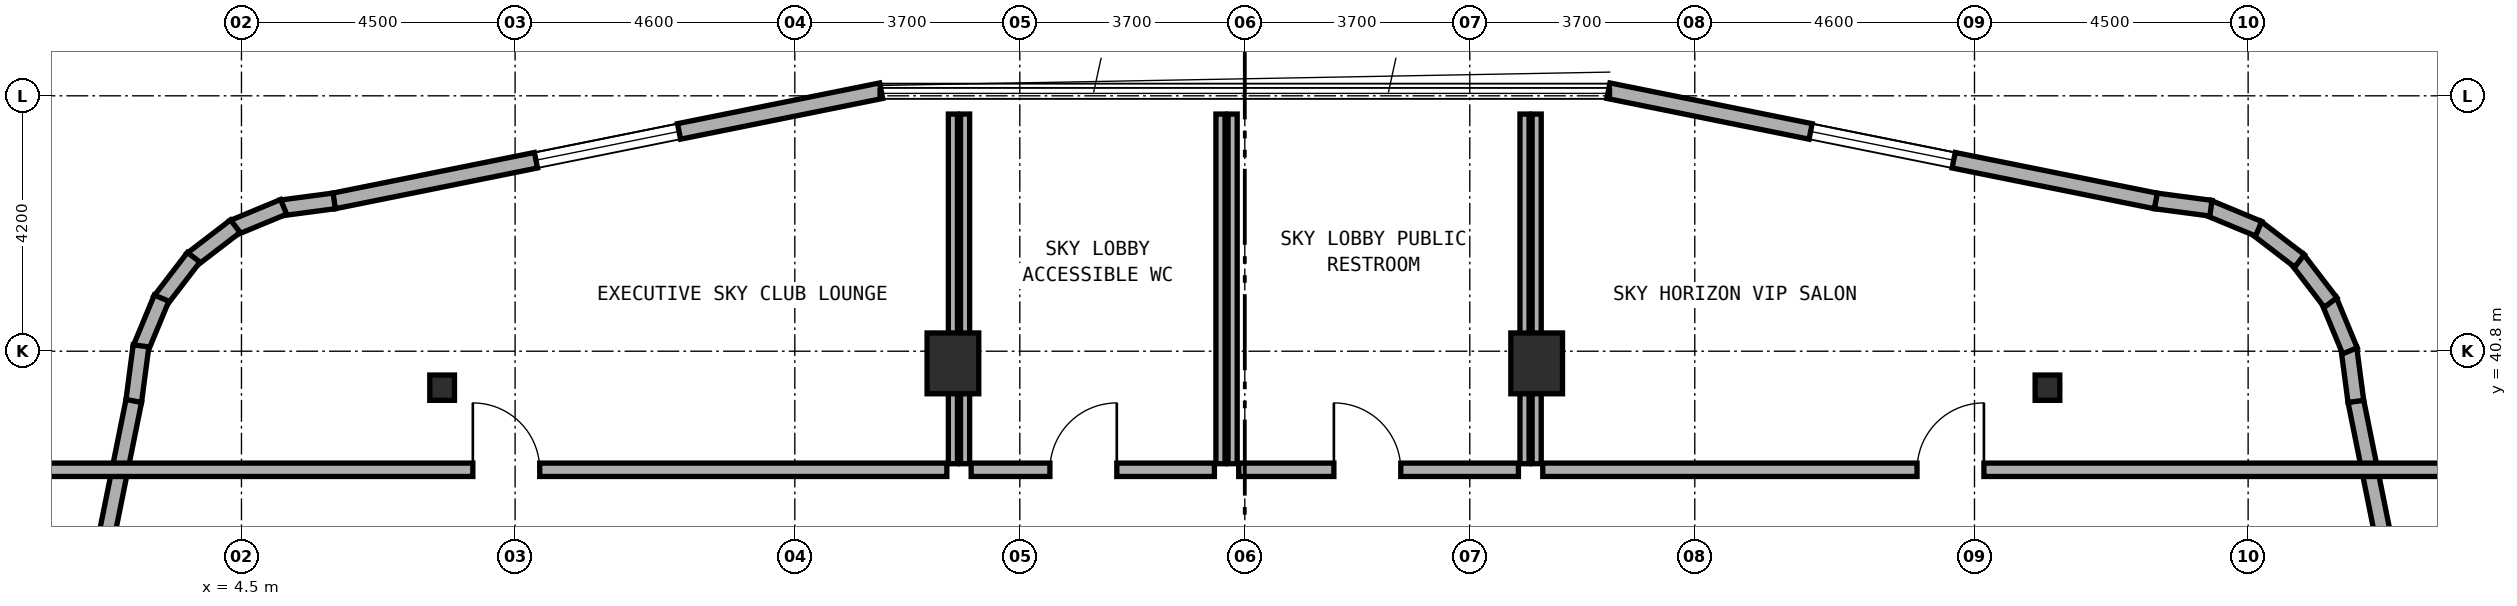
"""IFC4 building model, lengths in metres.
Left out: names, types, materials, properties, quantities, classifications, styles, units other than length and angle.
Written with IfcOpenShell. Run it as: python <this file> out.ifc"""

import sys

from ifc_helpers import new_model, si_unit, direction, frame, frame_2d, origin, origin_2d, place, context, subcontext, project, spatial, rectangle, i_section, extrude, element, fill, save


model = new_model("IFC4")
c1 = context("Model", 3, precision=1e-05, world=origin(), true_north=direction((0.0, 1.0)))
c2 = subcontext(c1, "Body", "Model", "MODEL_VIEW")
j1 = project(units=[si_unit("LENGTHUNIT", "METRE"), si_unit("PLANEANGLEUNIT", "RADIAN")], contexts=[c1])
p1 = place(None, origin())
s1 = spatial("IfcSite", under=j1, at=p1, CompositionType="ELEMENT")
p2 = place(p1, origin())
s2 = spatial("IfcBuilding", under=s1, at=p2, CompositionType="ELEMENT")
p3 = place(p2, frame((0.0, 0.0, 119.5)))
s3 = spatial("IfcBuildingStorey", under=s2, at=p3, CompositionType="ELEMENT", Elevation=119.5)
for number, where, z_axis, x_axis in (
    (1, (16.2, 40.6, 0.0), (0.0, 0.0, 1.0), (1.0, 0.0, 0.0)),
    (2, (25.8, 40.6, 0.0), (0.0, 0.0, 1.0), (1.0, 0.0, 0.0)),
):
    element("IfcColumn", number, at=place(p3, frame(where, z_axis=z_axis, x_axis=x_axis)), inside=s3, PredefinedType="COLUMN", context=c2, shape_type="SweptSolid", body=[
        extrude(rectangle(XDim=0.85, YDim=1.0, at=origin_2d()), origin(), (0.0, 0.0, 1.0), 4.5),
    ])
for number, where, z_axis, x_axis in (
    (3, (34.2, 40.2, 0.0), (0.0, 0.0, 1.0), (1.0, 0.0, 0.0)),
    (4, (7.8, 40.2, 0.0), (0.0, 0.0, 1.0), (1.0, 0.0, 0.0)),
):
    element("IfcColumn", number, at=place(p3, frame(where, z_axis=z_axis, x_axis=x_axis)), inside=s3, PredefinedType="COLUMN", context=c2, shape_type="SweptSolid", body=[
        extrude(i_section(OverallWidth=0.406, OverallDepth=0.416, WebThickness=0.024, FlangeThickness=0.039, FilletRadius=0.015, at=origin_2d()), origin(), (0.0, 0.0, 1.0), 4.5),
    ])
p4 = place(p3, frame((41.084, 30.98, 0.0), z_axis=(0.0, 0.0, 1.0), x_axis=(-0.197435082048, 0.980315963543, 0.0)))
e5 = element("IfcWall", 5, at=p4, inside=s3, PredefinedType="STANDARD", context=c2, shape_type="SweptSolid", body=[
    extrude(rectangle(XDim=9.183, YDim=0.26, at=frame_2d((4.591, 0.0))), origin(), (0.0, 0.0, 1.0), 4.22),
])
p5 = place(p4, frame((2.752, 0.0, 0.8)))
e6 = element("IfcOpeningElement", 6, at=p5, cuts=e5, PredefinedType="OPENING", context=c2, shape_type="SweptSolid", body=[
    extrude(rectangle(XDim=2.4, YDim=1.6, at=frame_2d((1.2, 0.8))), frame((0.0, 0.14, 0.0), z_axis=(0.0, -1.0, 0.0), x_axis=(1.0, 0.0, 0.0)), (0.0, 0.0, 1.0), 0.28),
])
p6 = place(p3, frame((39.272, 39.975, 0.0), z_axis=(0.0, 0.0, 1.0), x_axis=(-0.130953706898, 0.991388484223, 0.0)))
e7 = element("IfcWall", 7, at=p6, inside=s3, PredefinedType="STANDARD", context=c2, shape_type="SweptSolid", body=[
    extrude(rectangle(XDim=0.885, YDim=0.26, at=frame_2d((0.443, 0.0))), origin(), (0.0, 0.0, 1.0), 4.22),
])
p7 = place(p3, frame((39.174, 40.807, 0.0), z_axis=(0.0, 0.0, 1.0), x_axis=(-0.383290660547, 0.923627776508, 0.0)))
e8 = element("IfcWall", 8, at=p7, inside=s3, PredefinedType="STANDARD", context=c2, shape_type="SweptSolid", body=[
    extrude(rectangle(XDim=0.903, YDim=0.26, at=frame_2d((0.452, 0.0))), origin(), (0.0, 0.0, 1.0), 4.22),
])
p8 = place(p3, frame((38.856, 41.601, 0.0), z_axis=(0.0, 0.0, 1.0), x_axis=(-0.608624690463, 0.793458244748, 0.0)))
e9 = element("IfcWall", 9, at=p8, inside=s3, PredefinedType="STANDARD", context=c2, shape_type="SweptSolid", body=[
    extrude(rectangle(XDim=0.902, YDim=0.26, at=frame_2d((0.451, 0.0))), origin(), (0.0, 0.0, 1.0), 4.22),
])
p9 = place(p3, frame((38.345, 42.286, 0.0), z_axis=(0.0, 0.0, 1.0), x_axis=(-0.793558456666, 0.608494022858, 0.0)))
e10 = element("IfcWall", 10, at=p9, inside=s3, PredefinedType="STANDARD", context=c2, shape_type="SweptSolid", body=[
    extrude(rectangle(XDim=0.902, YDim=0.26, at=frame_2d((0.451, 0.0))), origin(), (0.0, 0.0, 1.0), 4.22),
])
p10 = place(p3, frame((37.673, 42.814, 0.0), z_axis=(0.0, 0.0, 1.0), x_axis=(-0.923683767999, 0.383155708213, 0.0)))
e11 = element("IfcWall", 11, at=p10, inside=s3, PredefinedType="STANDARD", context=c2, shape_type="SweptSolid", body=[
    extrude(rectangle(XDim=0.903, YDim=0.26, at=frame_2d((0.451, 0.0))), origin(), (0.0, 0.0, 1.0), 4.22),
])
p11 = place(p3, frame((36.888, 43.152, 0.0), z_axis=(0.0, 0.0, 1.0), x_axis=(-0.991487658083, 0.130200706103, 0.0)))
e12 = element("IfcWall", 12, at=p11, inside=s3, PredefinedType="STANDARD", context=c2, shape_type="SweptSolid", body=[
    extrude(rectangle(XDim=0.921, YDim=0.26, at=frame_2d((0.46, 0.0))), origin(), (0.0, 0.0, 1.0), 4.22),
])
p12 = place(p3, frame((35.982, 43.271, 0.0), z_axis=(0.0, 0.0, 1.0), x_axis=(-0.980315963543, 0.197435082048, 0.0)))
e13 = element("IfcWall", 13, at=p12, inside=s3, PredefinedType="STANDARD", context=c2, shape_type="SweptSolid", body=[
    extrude(rectangle(XDim=9.183, YDim=0.26, at=frame_2d((4.591, 0.0))), origin(), (0.0, 0.0, 1.0), 4.22),
])
p13 = place(p12, frame((3.391, 0.0, 0.8)))
e14 = element("IfcOpeningElement", 14, at=p13, cuts=e13, PredefinedType="OPENING", context=c2, shape_type="SweptSolid", body=[
    extrude(rectangle(XDim=2.4, YDim=1.6, at=frame_2d((1.2, 0.8))), frame((0.0, 0.14, 0.0), z_axis=(0.0, -1.0, 0.0), x_axis=(1.0, 0.0, 0.0)), (0.0, 0.0, 1.0), 0.28),
])
p14 = place(p3, frame((15.02, 45.084, 0.0), z_axis=(0.0, 0.0, 1.0), x_axis=(-0.980315963543, -0.197435082048, 0.0)))
e15 = element("IfcWall", 15, at=p14, inside=s3, PredefinedType="STANDARD", context=c2, shape_type="SweptSolid", body=[
    extrude(rectangle(XDim=9.183, YDim=0.26, at=frame_2d((4.591, 0.0))), origin(), (0.0, 0.0, 1.0), 4.22),
])
p15 = place(p14, frame((3.391, 0.0, 0.8)))
e16 = element("IfcOpeningElement", 16, at=p15, cuts=e15, PredefinedType="OPENING", context=c2, shape_type="SweptSolid", body=[
    extrude(rectangle(XDim=2.4, YDim=1.6, at=frame_2d((1.2, 0.8))), frame((0.0, 0.14, 0.0), z_axis=(0.0, -1.0, 0.0), x_axis=(1.0, 0.0, 0.0)), (0.0, 0.0, 1.0), 0.28),
])
p16 = place(p3, frame((6.025, 43.272, 0.0), z_axis=(0.0, 0.0, 1.0), x_axis=(-0.991388484223, -0.130953706898, 0.0)))
e17 = element("IfcWall", 17, at=p16, inside=s3, PredefinedType="STANDARD", context=c2, shape_type="SweptSolid", body=[
    extrude(rectangle(XDim=0.885, YDim=0.26, at=frame_2d((0.443, 0.0))), origin(), (0.0, 0.0, 1.0), 4.22),
])
p17 = place(p3, frame((5.193, 43.174, 0.0), z_axis=(0.0, 0.0, 1.0), x_axis=(-0.923627776508, -0.383290660547, 0.0)))
e18 = element("IfcWall", 18, at=p17, inside=s3, PredefinedType="STANDARD", context=c2, shape_type="SweptSolid", body=[
    extrude(rectangle(XDim=0.903, YDim=0.26, at=frame_2d((0.452, 0.0))), origin(), (0.0, 0.0, 1.0), 4.22),
])
p18 = place(p3, frame((4.399, 42.856, 0.0), z_axis=(0.0, 0.0, 1.0), x_axis=(-0.793458244748, -0.608624690463, 0.0)))
e19 = element("IfcWall", 19, at=p18, inside=s3, PredefinedType="STANDARD", context=c2, shape_type="SweptSolid", body=[
    extrude(rectangle(XDim=0.902, YDim=0.26, at=frame_2d((0.451, 0.0))), origin(), (0.0, 0.0, 1.0), 4.22),
])
p19 = place(p3, frame((3.714, 42.345, 0.0), z_axis=(0.0, 0.0, 1.0), x_axis=(-0.608494022858, -0.793558456666, 0.0)))
e20 = element("IfcWall", 20, at=p19, inside=s3, PredefinedType="STANDARD", context=c2, shape_type="SweptSolid", body=[
    extrude(rectangle(XDim=0.902, YDim=0.26, at=frame_2d((0.451, 0.0))), origin(), (0.0, 0.0, 1.0), 4.22),
])
p20 = place(p3, frame((3.186, 41.673, 0.0), z_axis=(0.0, 0.0, 1.0), x_axis=(-0.383155708213, -0.923683767999, 0.0)))
e21 = element("IfcWall", 21, at=p20, inside=s3, PredefinedType="STANDARD", context=c2, shape_type="SweptSolid", body=[
    extrude(rectangle(XDim=0.903, YDim=0.26, at=frame_2d((0.451, 0.0))), origin(), (0.0, 0.0, 1.0), 4.22),
])
p21 = place(p3, frame((2.848, 40.888, 0.0), z_axis=(0.0, 0.0, 1.0), x_axis=(-0.130200706103, -0.991487658083, 0.0)))
e22 = element("IfcWall", 22, at=p21, inside=s3, PredefinedType="STANDARD", context=c2, shape_type="SweptSolid", body=[
    extrude(rectangle(XDim=0.921, YDim=0.26, at=frame_2d((0.46, 0.0))), origin(), (0.0, 0.0, 1.0), 4.22),
])
p22 = place(p3, frame((2.729, 39.982, 0.0), z_axis=(0.0, 0.0, 1.0), x_axis=(-0.197435082048, -0.980315963543, 0.0)))
e23 = element("IfcWall", 23, at=p22, inside=s3, PredefinedType="STANDARD", context=c2, shape_type="SweptSolid", body=[
    extrude(rectangle(XDim=9.183, YDim=0.26, at=frame_2d((4.591, 0.0))), origin(), (0.0, 0.0, 1.0), 4.22),
])
p23 = place(p22, frame((3.27, 0.0, 0.8)))
e24 = element("IfcOpeningElement", 24, at=p23, cuts=e23, PredefinedType="OPENING", context=c2, shape_type="SweptSolid", body=[
    extrude(rectangle(XDim=2.4, YDim=1.6, at=frame_2d((1.2, 0.8))), frame((0.0, 0.14, 0.0), z_axis=(0.0, -1.0, 0.0), x_axis=(1.0, 0.0, 0.0)), (0.0, 0.0, 1.0), 0.28),
])
p24 = place(p3, frame((16.2, 38.95, 0.0), z_axis=(0.0, 0.0, 1.0), x_axis=(0.0, 1.0, 0.0)))
e25 = element("IfcWall", 25, at=p24, inside=s3, PredefinedType="PARTITIONING", context=c2, shape_type="SweptSolid", body=[
    extrude(rectangle(XDim=5.75, YDim=0.15, at=frame_2d((2.875, 0.0))), origin(), (0.0, 0.0, 1.0), 3.695),
])
p25 = place(p3, frame((1.3, 38.85, 0.0), z_axis=(0.0, 0.0, 1.0), x_axis=(1.0, 0.0, 0.0)))
e26 = element("IfcWall", 26, at=p25, inside=s3, PredefinedType="SOLIDWALL", context=c2, shape_type="SweptSolid", body=[
    extrude(rectangle(XDim=14.8, YDim=0.22, at=frame_2d((7.4, 0.0))), origin(), (0.0, 0.0, 1.0), 3.695),
])
p26 = place(p25, frame((7.005, 0.0, 0.0)))
e27 = element("IfcOpeningElement", 27, at=p26, cuts=e26, PredefinedType="OPENING", context=c2, shape_type="SweptSolid", body=[
    extrude(rectangle(XDim=1.1, YDim=2.1, at=frame_2d((0.55, 1.05))), frame((0.0, 0.12, 0.0), z_axis=(0.0, -1.0, 0.0), x_axis=(1.0, 0.0, 0.0)), (0.0, 0.0, 1.0), 0.24),
])
p27 = place(p3, frame((16.4, 38.95, 0.0), z_axis=(0.0, 0.0, 1.0), x_axis=(0.0, 1.0, 0.0)))
e28 = element("IfcWall", 28, at=p27, inside=s3, PredefinedType="PARTITIONING", context=c2, shape_type="SweptSolid", body=[
    extrude(rectangle(XDim=5.75, YDim=0.15, at=frame_2d((2.875, 0.0))), origin(), (0.0, 0.0, 1.0), 3.695),
])
p28 = place(p3, frame((20.6, 38.95, 0.0), z_axis=(0.0, 0.0, 1.0), x_axis=(0.0, 1.0, 0.0)))
e29 = element("IfcWall", 29, at=p28, inside=s3, PredefinedType="PARTITIONING", context=c2, shape_type="SweptSolid", body=[
    extrude(rectangle(XDim=5.75, YDim=0.15, at=frame_2d((2.875, 0.0))), origin(), (0.0, 0.0, 1.0), 3.835),
])
p29 = place(p3, frame((16.5, 38.85, 0.0), z_axis=(0.0, 0.0, 1.0), x_axis=(1.0, 0.0, 0.0)))
e30 = element("IfcWall", 30, at=p29, inside=s3, PredefinedType="SOLIDWALL", context=c2, shape_type="SweptSolid", body=[
    extrude(rectangle(XDim=4.0, YDim=0.22, at=frame_2d((2.0, 0.0))), origin(), (0.0, 0.0, 1.0), 4.22),
])
p30 = place(p29, frame((1.295, 0.0, 0.0)))
e31 = element("IfcOpeningElement", 31, at=p30, cuts=e30, PredefinedType="OPENING", context=c2, shape_type="SweptSolid", body=[
    extrude(rectangle(XDim=1.1, YDim=2.1, at=frame_2d((0.55, 1.05))), frame((0.0, 0.12, 0.0), z_axis=(0.0, -1.0, 0.0), x_axis=(1.0, 0.0, 0.0)), (0.0, 0.0, 1.0), 0.24),
])
p31 = place(p3, frame((20.8, 38.95, 0.0), z_axis=(0.0, 0.0, 1.0), x_axis=(0.0, 1.0, 0.0)))
e32 = element("IfcWall", 32, at=p31, inside=s3, PredefinedType="PARTITIONING", context=c2, shape_type="SweptSolid", body=[
    extrude(rectangle(XDim=5.75, YDim=0.15, at=frame_2d((2.875, 0.0))), origin(), (0.0, 0.0, 1.0), 3.835),
])
p32 = place(p3, frame((25.6, 38.95, 0.0), z_axis=(0.0, 0.0, 1.0), x_axis=(0.0, 1.0, 0.0)))
e33 = element("IfcWall", 33, at=p32, inside=s3, PredefinedType="PARTITIONING", context=c2, shape_type="SweptSolid", body=[
    extrude(rectangle(XDim=5.75, YDim=0.15, at=frame_2d((2.875, 0.0))), origin(), (0.0, 0.0, 1.0), 3.695),
])
p33 = place(p3, frame((20.9, 38.85, 0.0), z_axis=(0.0, 0.0, 1.0), x_axis=(1.0, 0.0, 0.0)))
e34 = element("IfcWall", 34, at=p33, inside=s3, PredefinedType="SOLIDWALL", context=c2, shape_type="SweptSolid", body=[
    extrude(rectangle(XDim=4.6, YDim=0.22, at=frame_2d((2.3, 0.0))), origin(), (0.0, 0.0, 1.0), 4.22),
])
p34 = place(p33, frame((1.565, 0.0, 0.0)))
e35 = element("IfcOpeningElement", 35, at=p34, cuts=e34, PredefinedType="OPENING", context=c2, shape_type="SweptSolid", body=[
    extrude(rectangle(XDim=1.1, YDim=2.1, at=frame_2d((0.55, 1.05))), frame((0.0, 0.12, 0.0), z_axis=(0.0, -1.0, 0.0), x_axis=(1.0, 0.0, 0.0)), (0.0, 0.0, 1.0), 0.24),
])
p35 = place(p3, frame((25.8, 38.95, 0.0), z_axis=(0.0, 0.0, 1.0), x_axis=(0.0, 1.0, 0.0)))
e36 = element("IfcWall", 36, at=p35, inside=s3, PredefinedType="PARTITIONING", context=c2, shape_type="SweptSolid", body=[
    extrude(rectangle(XDim=5.75, YDim=0.15, at=frame_2d((2.875, 0.0))), origin(), (0.0, 0.0, 1.0), 3.695),
])
p36 = place(p3, frame((25.9, 38.85, 0.0), z_axis=(0.0, 0.0, 1.0), x_axis=(1.0, 0.0, 0.0)))
e37 = element("IfcWall", 37, at=p36, inside=s3, PredefinedType="SOLIDWALL", context=c2, shape_type="SweptSolid", body=[
    extrude(rectangle(XDim=14.8, YDim=0.22, at=frame_2d((7.4, 0.0))), origin(), (0.0, 0.0, 1.0), 3.695),
])
p37 = place(p36, frame((6.155, 0.0, 0.0)))
e38 = element("IfcOpeningElement", 38, at=p37, cuts=e37, PredefinedType="OPENING", context=c2, shape_type="SweptSolid", body=[
    extrude(rectangle(XDim=1.1, YDim=2.1, at=frame_2d((0.55, 1.05))), frame((0.0, 0.12, 0.0), z_axis=(0.0, -1.0, 0.0), x_axis=(1.0, 0.0, 0.0)), (0.0, 0.0, 1.0), 0.24),
])
p38 = place(p13, origin())
e39 = element("IfcWindow", 39, at=p38, inside=s3, PartitioningType="SINGLE_PANEL", PredefinedType="WINDOW", context=c2, shape_type="SweptSolid", body=[
    extrude(rectangle(XDim=2.4, YDim=1.6, at=frame_2d((1.2, 0.8))), frame((0.0, 0.03, 0.0), z_axis=(0.0, -1.0, 0.0), x_axis=(1.0, 0.0, 0.0)), (0.0, 0.0, 1.0), 0.06),
])
fill(e14, e39)
p39 = place(p15, origin())
e40 = element("IfcWindow", 40, at=p39, inside=s3, PartitioningType="SINGLE_PANEL", PredefinedType="WINDOW", context=c2, shape_type="SweptSolid", body=[
    extrude(rectangle(XDim=2.4, YDim=1.6, at=frame_2d((1.2, 0.8))), frame((0.0, 0.03, 0.0), z_axis=(0.0, -1.0, 0.0), x_axis=(1.0, 0.0, 0.0)), (0.0, 0.0, 1.0), 0.06),
])
fill(e16, e40)
p40 = place(p26, origin())
e41 = element("IfcDoor", 41, at=p40, inside=s3, OperationType="SINGLE_SWING_LEFT", PredefinedType="DOOR", context=c2, shape_type="SweptSolid", body=[
    extrude(rectangle(XDim=1.1, YDim=2.1, at=frame_2d((0.55, 1.05))), frame((0.0, 0.025, 0.0), z_axis=(0.0, -1.0, 0.0), x_axis=(1.0, 0.0, 0.0)), (0.0, 0.0, 1.0), 0.05),
])
fill(e27, e41)
p41 = place(p30, origin())
e42 = element("IfcDoor", 42, at=p41, inside=s3, OperationType="SINGLE_SWING_RIGHT", PredefinedType="DOOR", context=c2, shape_type="SweptSolid", body=[
    extrude(rectangle(XDim=1.1, YDim=2.1, at=frame_2d((0.55, 1.05))), frame((0.0, 0.025, 0.0), z_axis=(0.0, -1.0, 0.0), x_axis=(1.0, 0.0, 0.0)), (0.0, 0.0, 1.0), 0.05),
])
fill(e31, e42)
p42 = place(p34, origin())
e43 = element("IfcDoor", 43, at=p42, inside=s3, OperationType="SINGLE_SWING_LEFT", PredefinedType="DOOR", context=c2, shape_type="SweptSolid", body=[
    extrude(rectangle(XDim=1.1, YDim=2.1, at=frame_2d((0.55, 1.05))), frame((0.0, 0.025, 0.0), z_axis=(0.0, -1.0, 0.0), x_axis=(1.0, 0.0, 0.0)), (0.0, 0.0, 1.0), 0.05),
])
fill(e35, e43)
p43 = place(p37, origin())
e44 = element("IfcDoor", 44, at=p43, inside=s3, OperationType="SINGLE_SWING_RIGHT", PredefinedType="DOOR", context=c2, shape_type="SweptSolid", body=[
    extrude(rectangle(XDim=1.1, YDim=2.1, at=frame_2d((0.55, 1.05))), frame((0.0, 0.025, 0.0), z_axis=(0.0, -1.0, 0.0), x_axis=(1.0, 0.0, 0.0)), (0.0, 0.0, 1.0), 0.05),
])
fill(e38, e44)
save(model, sys.argv[1])
